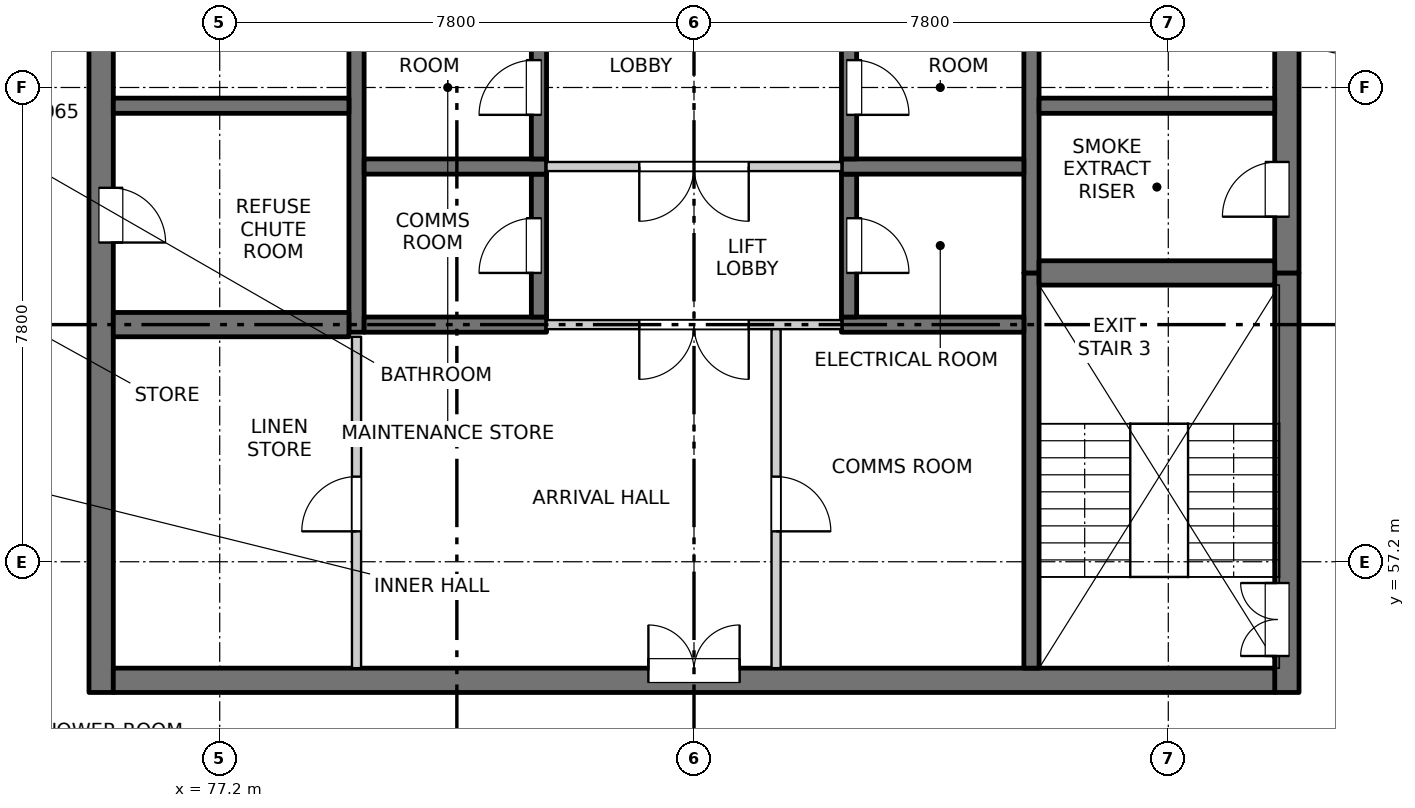
"""IFC4 building model, lengths in metres.
Left out: names, types, materials, properties, quantities, classifications, styles, units other than length and angle.
Written with IfcOpenShell. Run it as: python <this file> out.ifc"""

import sys

from ifc_helpers import new_model, si_unit, direction, frame, frame_2d, origin, place, context, subcontext, project, spatial, rectangle, extrude, element, fill, save


model = new_model("IFC4")
c1 = context("Model", 3, precision=1e-05, world=origin(), true_north=direction((0.0, 1.0)))
c2 = subcontext(c1, "Body", "Model", "MODEL_VIEW")
j1 = project(units=[si_unit("LENGTHUNIT", "METRE"), si_unit("PLANEANGLEUNIT", "RADIAN")], contexts=[c1])
p1 = place(None, origin())
s1 = spatial("IfcSite", under=j1, at=p1, CompositionType="ELEMENT")
p2 = place(p1, origin())
s2 = spatial("IfcBuilding", under=s1, at=p2, CompositionType="ELEMENT")
p3 = place(p2, frame((0.0, 0.0, 234.7)))
s3 = spatial("IfcBuildingStorey", under=s2, at=p3, CompositionType="ELEMENT", Elevation=234.7)
p4 = place(p3, frame((75.25, 55.05, -0.25), z_axis=(0.0, 0.0, 1.0), x_axis=(0.0, 1.0, 0.0)))
e1 = element("IfcWall", 1, at=p4, inside=s3, PredefinedType="SOLIDWALL", context=c2, shape_type="SweptSolid", body=[
    extrude(rectangle(XDim=22.25, YDim=0.4, at=frame_2d((11.125, 0.0))), origin(), (0.0, 0.0, 1.0), 3.4),
])
p5 = place(p4, frame((7.4, 0.0, 0.25)))
e2 = element("IfcOpeningElement", 2, at=p5, cuts=e1, PredefinedType="OPENING", context=c2, shape_type="SweptSolid", body=[
    extrude(rectangle(XDim=0.9, YDim=2.1, at=frame_2d((0.45, 1.05))), frame((0.0, 0.21, 0.0), z_axis=(0.0, -1.0, 0.0), x_axis=(1.0, 0.0, 0.0)), (0.0, 0.0, 1.0), 0.42),
])
p6 = place(p4, frame((12.05, 0.0, 0.25)))
e3 = element("IfcOpeningElement", 3, at=p6, cuts=e1, PredefinedType="OPENING", context=c2, shape_type="SweptSolid", body=[
    extrude(rectangle(XDim=0.9, YDim=2.1, at=frame_2d((0.45, 1.05))), frame((0.0, 0.21, 0.0), z_axis=(0.0, -1.0, 0.0), x_axis=(1.0, 0.0, 0.0)), (0.0, 0.0, 1.0), 0.42),
])
p7 = place(p4, frame((16.55, 0.0, 0.25)))
e4 = element("IfcOpeningElement", 4, at=p7, cuts=e1, PredefinedType="OPENING", context=c2, shape_type="SweptSolid", body=[
    extrude(rectangle(XDim=0.9, YDim=2.1, at=frame_2d((0.45, 1.05))), frame((0.0, 0.21, 0.0), z_axis=(0.0, -1.0, 0.0), x_axis=(1.0, 0.0, 0.0)), (0.0, 0.0, 1.0), 0.42),
])
p8 = place(p4, frame((20.0, 0.0, 0.25)))
e5 = element("IfcOpeningElement", 5, at=p8, cuts=e1, PredefinedType="OPENING", context=c2, shape_type="SweptSolid", body=[
    extrude(rectangle(XDim=0.9, YDim=2.1, at=frame_2d((0.45, 1.05))), frame((0.0, 0.21, 0.0), z_axis=(0.0, -1.0, 0.0), x_axis=(1.0, 0.0, 0.0)), (0.0, 0.0, 1.0), 0.42),
])
p9 = place(p3, frame((94.75, 55.05, -0.25), z_axis=(0.0, 0.0, 1.0), x_axis=(0.0, 1.0, 0.0)))
e6 = element("IfcWall", 6, at=p9, inside=s3, PredefinedType="SOLIDWALL", context=c2, shape_type="SweptSolid", body=[
    extrude(rectangle(XDim=6.9, YDim=0.4, at=frame_2d((3.45, 0.0))), origin(), (0.0, 0.0, 1.0), 3.4),
])
p10 = place(p9, frame((0.6, 0.0, 0.25)))
e7 = element("IfcOpeningElement", 7, at=p10, cuts=e6, PredefinedType="OPENING", context=c2, shape_type="SweptSolid", body=[
    extrude(rectangle(XDim=1.2, YDim=2.1, at=frame_2d((0.6, 1.05))), frame((0.0, 0.21, 0.0), z_axis=(0.0, -1.0, 0.0), x_axis=(1.0, 0.0, 0.0)), (0.0, 0.0, 1.0), 0.42),
])
p11 = place(p3, frame((94.75, 61.95, -0.25), z_axis=(0.0, 0.0, 1.0), x_axis=(0.0, 1.0, 0.0)))
e8 = element("IfcWall", 8, at=p11, inside=s3, PredefinedType="SOLIDWALL", context=c2, shape_type="SweptSolid", body=[
    extrude(rectangle(XDim=15.35, YDim=0.4, at=frame_2d((7.675, 0.0))), origin(), (0.0, 0.0, 1.0), 3.4),
])
p12 = place(p11, frame((0.925, 0.0, 0.25)))
e9 = element("IfcOpeningElement", 9, at=p12, cuts=e8, PredefinedType="OPENING", context=c2, shape_type="SweptSolid", body=[
    extrude(rectangle(XDim=0.9, YDim=2.1, at=frame_2d((0.45, 1.05))), frame((0.0, 0.21, 0.0), z_axis=(0.0, -1.0, 0.0), x_axis=(1.0, 0.0, 0.0)), (0.0, 0.0, 1.0), 0.42),
])
p13 = place(p11, frame((6.8, 0.0, 0.25)))
e10 = element("IfcOpeningElement", 10, at=p13, cuts=e8, PredefinedType="OPENING", context=c2, shape_type="SweptSolid", body=[
    extrude(rectangle(XDim=0.9, YDim=2.1, at=frame_2d((0.45, 1.05))), frame((0.0, 0.21, 0.0), z_axis=(0.0, -1.0, 0.0), x_axis=(1.0, 0.0, 0.0)), (0.0, 0.0, 1.0), 0.42),
])
p14 = place(p11, frame((13.1, 0.0, 0.25)))
e11 = element("IfcOpeningElement", 11, at=p14, cuts=e8, PredefinedType="OPENING", context=c2, shape_type="SweptSolid", body=[
    extrude(rectangle(XDim=0.9, YDim=2.1, at=frame_2d((0.45, 1.05))), frame((0.0, 0.21, 0.0), z_axis=(0.0, -1.0, 0.0), x_axis=(1.0, 0.0, 0.0)), (0.0, 0.0, 1.0), 0.42),
])
p15 = place(p3, frame((75.45, 55.25, -0.25), z_axis=(0.0, 0.0, 1.0), x_axis=(1.0, 0.0, 0.0)))
e12 = element("IfcWall", 12, at=p15, inside=s3, PredefinedType="SOLIDWALL", context=c2, shape_type="SweptSolid", body=[
    extrude(rectangle(XDim=19.1, YDim=0.4, at=frame_2d((9.55, 0.0))), origin(), (0.0, 0.0, 1.0), 3.4),
])
p16 = place(p15, frame((8.8, 0.0, 0.25)))
e13 = element("IfcOpeningElement", 13, at=p16, cuts=e12, PredefinedType="OPENING", context=c2, shape_type="SweptSolid", body=[
    extrude(rectangle(XDim=1.5, YDim=2.1, at=frame_2d((0.75, 1.05))), frame((0.0, 0.21, 0.0), z_axis=(0.0, -1.0, 0.0), x_axis=(1.0, 0.0, 0.0)), (0.0, 0.0, 1.0), 0.42),
])
p17 = place(p3, frame((79.45, 60.975, -0.25), z_axis=(0.0, 0.0, 1.0), x_axis=(0.0, 1.0, 0.0)))
e14 = element("IfcWall", 14, at=p17, inside=s3, PredefinedType="SOLIDWALL", context=c2, shape_type="SweptSolid", body=[
    extrude(rectangle(XDim=16.325, YDim=0.25, at=frame_2d((8.163, 0.0))), origin(), (0.0, 0.0, 1.0), 3.4),
])
p18 = place(p3, frame((90.55, 55.45, -0.25), z_axis=(0.0, 0.0, 1.0), x_axis=(0.0, 1.0, 0.0)))
e15 = element("IfcWall", 15, at=p18, inside=s3, PredefinedType="SOLIDWALL", context=c2, shape_type="SweptSolid", body=[
    extrude(rectangle(XDim=6.5, YDim=0.25, at=frame_2d((3.25, 0.0))), origin(), (0.0, 0.0, 1.0), 3.4),
])
p19 = place(p3, frame((90.55, 61.95, -0.25), z_axis=(0.0, 0.0, 1.0), x_axis=(0.0, 1.0, 0.0)))
e16 = element("IfcWall", 16, at=p19, inside=s3, PredefinedType="SOLIDWALL", context=c2, shape_type="SweptSolid", body=[
    extrude(rectangle(XDim=15.35, YDim=0.25, at=frame_2d((7.675, 0.0))), origin(), (0.0, 0.0, 1.0), 3.4),
])
p20 = place(p3, frame((79.575, 61.1, -0.25), z_axis=(0.0, 0.0, 1.0), x_axis=(1.0, 0.0, 0.0)))
e17 = element("IfcWall", 17, at=p20, inside=s3, PredefinedType="SOLIDWALL", context=c2, shape_type="SweptSolid", body=[
    extrude(rectangle(XDim=3.0, YDim=0.25, at=frame_2d((1.5, 0.0))), origin(), (0.0, 0.0, 1.0), 3.4),
])
p21 = place(p3, frame((82.45, 61.225, -0.25), z_axis=(0.0, 0.0, 1.0), x_axis=(0.0, 1.0, 0.0)))
e18 = element("IfcWall", 18, at=p21, inside=s3, PredefinedType="SOLIDWALL", context=c2, shape_type="SweptSolid", body=[
    extrude(rectangle(XDim=2.35, YDim=0.25, at=frame_2d((1.175, 0.0))), origin(), (0.0, 0.0, 1.0), 3.4),
])
p22 = place(p21, frame((0.725, 0.0, 0.25)))
e19 = element("IfcOpeningElement", 19, at=p22, cuts=e18, PredefinedType="OPENING", context=c2, shape_type="SweptSolid", body=[
    extrude(rectangle(XDim=0.9, YDim=2.1, at=frame_2d((0.45, 1.05))), frame((0.0, 0.135, 0.0), z_axis=(0.0, -1.0, 0.0), x_axis=(1.0, 0.0, 0.0)), (0.0, 0.0, 1.0), 0.27),
])
p23 = place(p3, frame((79.575, 63.7, -0.25), z_axis=(0.0, 0.0, 1.0), x_axis=(1.0, 0.0, 0.0)))
e20 = element("IfcWall", 20, at=p23, inside=s3, PredefinedType="SOLIDWALL", context=c2, shape_type="SweptSolid", body=[
    extrude(rectangle(XDim=3.0, YDim=0.25, at=frame_2d((1.5, 0.0))), origin(), (0.0, 0.0, 1.0), 3.4),
])
p24 = place(p3, frame((82.45, 63.825, -0.25), z_axis=(0.0, 0.0, 1.0), x_axis=(0.0, 1.0, 0.0)))
e21 = element("IfcWall", 21, at=p24, inside=s3, PredefinedType="SOLIDWALL", context=c2, shape_type="SweptSolid", body=[
    extrude(rectangle(XDim=2.35, YDim=0.25, at=frame_2d((1.175, 0.0))), origin(), (0.0, 0.0, 1.0), 3.4),
])
p25 = place(p24, frame((0.725, 0.0, 0.25)))
e22 = element("IfcOpeningElement", 22, at=p25, cuts=e21, PredefinedType="OPENING", context=c2, shape_type="SweptSolid", body=[
    extrude(rectangle(XDim=0.9, YDim=2.1, at=frame_2d((0.45, 1.05))), frame((0.0, 0.135, 0.0), z_axis=(0.0, -1.0, 0.0), x_axis=(1.0, 0.0, 0.0)), (0.0, 0.0, 1.0), 0.27),
])
p26 = place(p3, frame((87.425, 61.1, -0.25), z_axis=(0.0, 0.0, 1.0), x_axis=(1.0, 0.0, 0.0)))
e23 = element("IfcWall", 23, at=p26, inside=s3, PredefinedType="SOLIDWALL", context=c2, shape_type="SweptSolid", body=[
    extrude(rectangle(XDim=3.0, YDim=0.25, at=frame_2d((1.5, 0.0))), origin(), (0.0, 0.0, 1.0), 3.4),
])
p27 = place(p3, frame((87.55, 61.225, -0.25), z_axis=(0.0, 0.0, 1.0), x_axis=(0.0, 1.0, 0.0)))
e24 = element("IfcWall", 24, at=p27, inside=s3, PredefinedType="SOLIDWALL", context=c2, shape_type="SweptSolid", body=[
    extrude(rectangle(XDim=2.35, YDim=0.25, at=frame_2d((1.175, 0.0))), origin(), (0.0, 0.0, 1.0), 3.4),
])
p28 = place(p27, frame((0.725, 0.0, 0.25)))
e25 = element("IfcOpeningElement", 25, at=p28, cuts=e24, PredefinedType="OPENING", context=c2, shape_type="SweptSolid", body=[
    extrude(rectangle(XDim=0.9, YDim=2.1, at=frame_2d((0.45, 1.05))), frame((0.0, 0.135, 0.0), z_axis=(0.0, -1.0, 0.0), x_axis=(1.0, 0.0, 0.0)), (0.0, 0.0, 1.0), 0.27),
])
p29 = place(p3, frame((87.425, 63.7, -0.25), z_axis=(0.0, 0.0, 1.0), x_axis=(1.0, 0.0, 0.0)))
e26 = element("IfcWall", 26, at=p29, inside=s3, PredefinedType="SOLIDWALL", context=c2, shape_type="SweptSolid", body=[
    extrude(rectangle(XDim=3.0, YDim=0.25, at=frame_2d((1.5, 0.0))), origin(), (0.0, 0.0, 1.0), 3.4),
])
p30 = place(p3, frame((87.55, 63.825, -0.25), z_axis=(0.0, 0.0, 1.0), x_axis=(0.0, 1.0, 0.0)))
e27 = element("IfcWall", 27, at=p30, inside=s3, PredefinedType="SOLIDWALL", context=c2, shape_type="SweptSolid", body=[
    extrude(rectangle(XDim=2.35, YDim=0.25, at=frame_2d((1.175, 0.0))), origin(), (0.0, 0.0, 1.0), 3.4),
])
p31 = place(p30, frame((0.725, 0.0, 0.25)))
e28 = element("IfcOpeningElement", 28, at=p31, cuts=e27, PredefinedType="OPENING", context=c2, shape_type="SweptSolid", body=[
    extrude(rectangle(XDim=0.9, YDim=2.1, at=frame_2d((0.45, 1.05))), frame((0.0, 0.135, 0.0), z_axis=(0.0, -1.0, 0.0), x_axis=(1.0, 0.0, 0.0)), (0.0, 0.0, 1.0), 0.27),
])
p32 = place(p3, frame((75.45, 61.1, -0.25), z_axis=(0.0, 0.0, 1.0), x_axis=(1.0, 0.0, 0.0)))
e29 = element("IfcWall", 29, at=p32, inside=s3, PredefinedType="SOLIDWALL", context=c2, shape_type="SweptSolid", body=[
    extrude(rectangle(XDim=3.875, YDim=0.4, at=frame_2d((1.938, 0.0))), origin(), (0.0, 0.0, 1.0), 3.4),
])
p33 = place(p3, frame((75.45, 64.7, -0.25), z_axis=(0.0, 0.0, 1.0), x_axis=(1.0, 0.0, 0.0)))
e30 = element("IfcWall", 30, at=p33, inside=s3, PredefinedType="SOLIDWALL", context=c2, shape_type="SweptSolid", body=[
    extrude(rectangle(XDim=3.875, YDim=0.25, at=frame_2d((1.938, 0.0))), origin(), (0.0, 0.0, 1.0), 3.4),
])
p34 = place(p3, frame((90.675, 61.95, -0.25), z_axis=(0.0, 0.0, 1.0), x_axis=(1.0, 0.0, 0.0)))
e31 = element("IfcWall", 31, at=p34, inside=s3, PredefinedType="SOLIDWALL", context=c2, shape_type="SweptSolid", body=[
    extrude(rectangle(XDim=3.875, YDim=0.4, at=frame_2d((1.938, 0.0))), origin(), (0.0, 0.0, 1.0), 3.4),
])
p35 = place(p3, frame((90.675, 64.7, -0.25), z_axis=(0.0, 0.0, 1.0), x_axis=(1.0, 0.0, 0.0)))
e32 = element("IfcWall", 32, at=p35, inside=s3, PredefinedType="SOLIDWALL", context=c2, shape_type="SweptSolid", body=[
    extrude(rectangle(XDim=3.875, YDim=0.25, at=frame_2d((1.938, 0.0))), origin(), (0.0, 0.0, 1.0), 3.4),
])
p36 = place(p3, frame((82.575, 61.1, 0.0), z_axis=(0.0, 0.0, 1.0), x_axis=(1.0, 0.0, 0.0)))
e33 = element("IfcWall", 33, at=p36, inside=s3, PredefinedType="PARTITIONING", context=c2, shape_type="SweptSolid", body=[
    extrude(rectangle(XDim=4.85, YDim=0.15, at=frame_2d((2.425, 0.0))), origin(), (0.0, 0.0, 1.0), 3.15),
])
p37 = place(p36, frame((1.525, 0.0, 0.0)))
e34 = element("IfcOpeningElement", 34, at=p37, cuts=e33, PredefinedType="OPENING", context=c2, shape_type="SweptSolid", body=[
    extrude(rectangle(XDim=1.8, YDim=2.1, at=frame_2d((0.9, 1.05))), frame((0.0, 0.085, 0.0), z_axis=(0.0, -1.0, 0.0), x_axis=(1.0, 0.0, 0.0)), (0.0, 0.0, 1.0), 0.17),
])
p38 = place(p3, frame((82.575, 63.7, 0.0), z_axis=(0.0, 0.0, 1.0), x_axis=(1.0, 0.0, 0.0)))
e35 = element("IfcWall", 35, at=p38, inside=s3, PredefinedType="PARTITIONING", context=c2, shape_type="SweptSolid", body=[
    extrude(rectangle(XDim=4.85, YDim=0.15, at=frame_2d((2.425, 0.0))), origin(), (0.0, 0.0, 1.0), 3.15),
])
p39 = place(p38, frame((1.525, 0.0, 0.0)))
e36 = element("IfcOpeningElement", 36, at=p39, cuts=e35, PredefinedType="OPENING", context=c2, shape_type="SweptSolid", body=[
    extrude(rectangle(XDim=1.8, YDim=2.1, at=frame_2d((0.9, 1.05))), frame((0.0, 0.085, 0.0), z_axis=(0.0, -1.0, 0.0), x_axis=(1.0, 0.0, 0.0)), (0.0, 0.0, 1.0), 0.17),
])
p40 = place(p3, frame((79.45, 55.45, 0.0), z_axis=(0.0, 0.0, 1.0), x_axis=(0.0, 1.0, 0.0)))
e37 = element("IfcWall", 37, at=p40, inside=s3, PredefinedType="PARTITIONING", context=c2, shape_type="SweptSolid", body=[
    extrude(rectangle(XDim=5.45, YDim=0.15, at=frame_2d((2.725, 0.0))), origin(), (0.0, 0.0, 1.0), 3.15),
])
p41 = place(p40, frame((2.25, 0.0, 0.0)))
e38 = element("IfcOpeningElement", 38, at=p41, cuts=e37, PredefinedType="OPENING", context=c2, shape_type="SweptSolid", body=[
    extrude(rectangle(XDim=0.9, YDim=2.1, at=frame_2d((0.45, 1.05))), frame((0.0, 0.085, 0.0), z_axis=(0.0, -1.0, 0.0), x_axis=(1.0, 0.0, 0.0)), (0.0, 0.0, 1.0), 0.17),
])
p42 = place(p3, frame((86.35, 55.45, 0.0), z_axis=(0.0, 0.0, 1.0), x_axis=(0.0, 1.0, 0.0)))
e39 = element("IfcWall", 39, at=p42, inside=s3, PredefinedType="PARTITIONING", context=c2, shape_type="SweptSolid", body=[
    extrude(rectangle(XDim=5.575, YDim=0.15, at=frame_2d((2.788, 0.0))), origin(), (0.0, 0.0, 1.0), 3.15),
])
p43 = place(p42, frame((2.25, 0.0, 0.0)))
e40 = element("IfcOpeningElement", 40, at=p43, cuts=e39, PredefinedType="OPENING", context=c2, shape_type="SweptSolid", body=[
    extrude(rectangle(XDim=0.9, YDim=2.1, at=frame_2d((0.45, 1.05))), frame((0.0, 0.085, 0.0), z_axis=(0.0, -1.0, 0.0), x_axis=(1.0, 0.0, 0.0)), (0.0, 0.0, 1.0), 0.17),
])
p44 = place(p16, origin())
e41 = element("IfcDoor", 41, at=p44, inside=s3, OperationType="DOUBLE_DOOR_SINGLE_SWING", PredefinedType="DOOR", context=c2, shape_type="SweptSolid", body=[
    extrude(rectangle(XDim=1.5, YDim=2.1, at=frame_2d((0.75, 1.05))), frame((0.0, 0.185, 0.0), z_axis=(0.0, -1.0, 0.0), x_axis=(1.0, 0.0, 0.0)), (0.0, 0.0, 1.0), 0.05),
])
fill(e13, e41)
p45 = place(p10, origin())
e42 = element("IfcDoor", 42, at=p45, inside=s3, OperationType="DOUBLE_DOOR_SINGLE_SWING", PredefinedType="DOOR", context=c2, shape_type="SweptSolid", body=[
    extrude(rectangle(XDim=1.2, YDim=2.1, at=frame_2d((0.6, 1.05))), frame((0.0, 0.185, 0.0), z_axis=(0.0, -1.0, 0.0), x_axis=(1.0, 0.0, 0.0)), (0.0, 0.0, 1.0), 0.05),
])
fill(e7, e42)
p46 = place(p41, origin())
e43 = element("IfcDoor", 43, at=p46, inside=s3, OperationType="SINGLE_SWING_LEFT", PredefinedType="DOOR", context=c2, shape_type="SweptSolid", body=[
    extrude(rectangle(XDim=0.9, YDim=2.1, at=frame_2d((0.45, 1.05))), frame((0.0, 0.025, 0.0), z_axis=(0.0, -1.0, 0.0), x_axis=(1.0, 0.0, 0.0)), (0.0, 0.0, 1.0), 0.05),
])
fill(e38, e43)
p47 = place(p43, origin())
e44 = element("IfcDoor", 44, at=p47, inside=s3, OperationType="SINGLE_SWING_RIGHT", PredefinedType="DOOR", context=c2, shape_type="SweptSolid", body=[
    extrude(rectangle(XDim=0.9, YDim=2.1, at=frame_2d((0.45, 1.05))), frame((0.0, 0.025, 0.0), z_axis=(0.0, -1.0, 0.0), x_axis=(1.0, 0.0, 0.0)), (0.0, 0.0, 1.0), 0.05),
])
fill(e40, e44)
p48 = place(p37, origin())
e45 = element("IfcDoor", 45, at=p48, inside=s3, OperationType="DOUBLE_DOOR_SINGLE_SWING", PredefinedType="DOOR", context=c2, shape_type="SweptSolid", body=[
    extrude(rectangle(XDim=1.8, YDim=2.1, at=frame_2d((0.9, 1.05))), frame((0.0, 0.025, 0.0), z_axis=(0.0, -1.0, 0.0), x_axis=(1.0, 0.0, 0.0)), (0.0, 0.0, 1.0), 0.05),
])
fill(e34, e45)
p49 = place(p22, origin())
e46 = element("IfcDoor", 46, at=p49, inside=s3, OperationType="SINGLE_SWING_LEFT", PredefinedType="DOOR", context=c2, shape_type="SweptSolid", body=[
    extrude(rectangle(XDim=0.9, YDim=2.1, at=frame_2d((0.45, 1.05))), frame((0.0, 0.11, 0.0), z_axis=(0.0, -1.0, 0.0), x_axis=(1.0, 0.0, 0.0)), (0.0, 0.0, 1.0), 0.05),
])
fill(e19, e46)
p50 = place(p28, origin())
e47 = element("IfcDoor", 47, at=p50, inside=s3, OperationType="SINGLE_SWING_RIGHT", PredefinedType="DOOR", context=c2, shape_type="SweptSolid", body=[
    extrude(rectangle(XDim=0.9, YDim=2.1, at=frame_2d((0.45, 1.05))), frame((0.0, -0.06, 0.0), z_axis=(0.0, -1.0, 0.0), x_axis=(1.0, 0.0, 0.0)), (0.0, 0.0, 1.0), 0.05),
])
fill(e25, e47)
p51 = place(p5, origin())
e48 = element("IfcDoor", 48, at=p51, inside=s3, OperationType="SINGLE_SWING_RIGHT", PredefinedType="DOOR", context=c2, shape_type="SweptSolid", body=[
    extrude(rectangle(XDim=0.9, YDim=2.1, at=frame_2d((0.45, 1.05))), frame((0.0, -0.135, 0.0), z_axis=(0.0, -1.0, 0.0), x_axis=(1.0, 0.0, 0.0)), (0.0, 0.0, 1.0), 0.05),
])
fill(e2, e48)
p52 = place(p12, origin())
e49 = element("IfcDoor", 49, at=p52, inside=s3, OperationType="SINGLE_SWING_LEFT", PredefinedType="DOOR", context=c2, shape_type="SweptSolid", body=[
    extrude(rectangle(XDim=0.9, YDim=2.1, at=frame_2d((0.45, 1.05))), frame((0.0, 0.185, 0.0), z_axis=(0.0, -1.0, 0.0), x_axis=(1.0, 0.0, 0.0)), (0.0, 0.0, 1.0), 0.05),
])
fill(e9, e49)
p53 = place(p39, origin())
e50 = element("IfcDoor", 50, at=p53, inside=s3, OperationType="DOUBLE_DOOR_SINGLE_SWING", PredefinedType="DOOR", context=c2, shape_type="SweptSolid", body=[
    extrude(rectangle(XDim=1.8, YDim=2.1, at=frame_2d((0.9, 1.05))), frame((0.0, 0.025, 0.0), z_axis=(0.0, -1.0, 0.0), x_axis=(1.0, 0.0, 0.0)), (0.0, 0.0, 1.0), 0.05),
])
fill(e36, e50)
p54 = place(p25, origin())
e51 = element("IfcDoor", 51, at=p54, inside=s3, OperationType="SINGLE_SWING_LEFT", PredefinedType="DOOR", context=c2, shape_type="SweptSolid", body=[
    extrude(rectangle(XDim=0.9, YDim=2.1, at=frame_2d((0.45, 1.05))), frame((0.0, 0.11, 0.0), z_axis=(0.0, -1.0, 0.0), x_axis=(1.0, 0.0, 0.0)), (0.0, 0.0, 1.0), 0.05),
])
fill(e22, e51)
p55 = place(p31, origin())
e52 = element("IfcDoor", 52, at=p55, inside=s3, OperationType="SINGLE_SWING_RIGHT", PredefinedType="DOOR", context=c2, shape_type="SweptSolid", body=[
    extrude(rectangle(XDim=0.9, YDim=2.1, at=frame_2d((0.45, 1.05))), frame((0.0, -0.06, 0.0), z_axis=(0.0, -1.0, 0.0), x_axis=(1.0, 0.0, 0.0)), (0.0, 0.0, 1.0), 0.05),
])
fill(e28, e52)
save(model, sys.argv[1])
